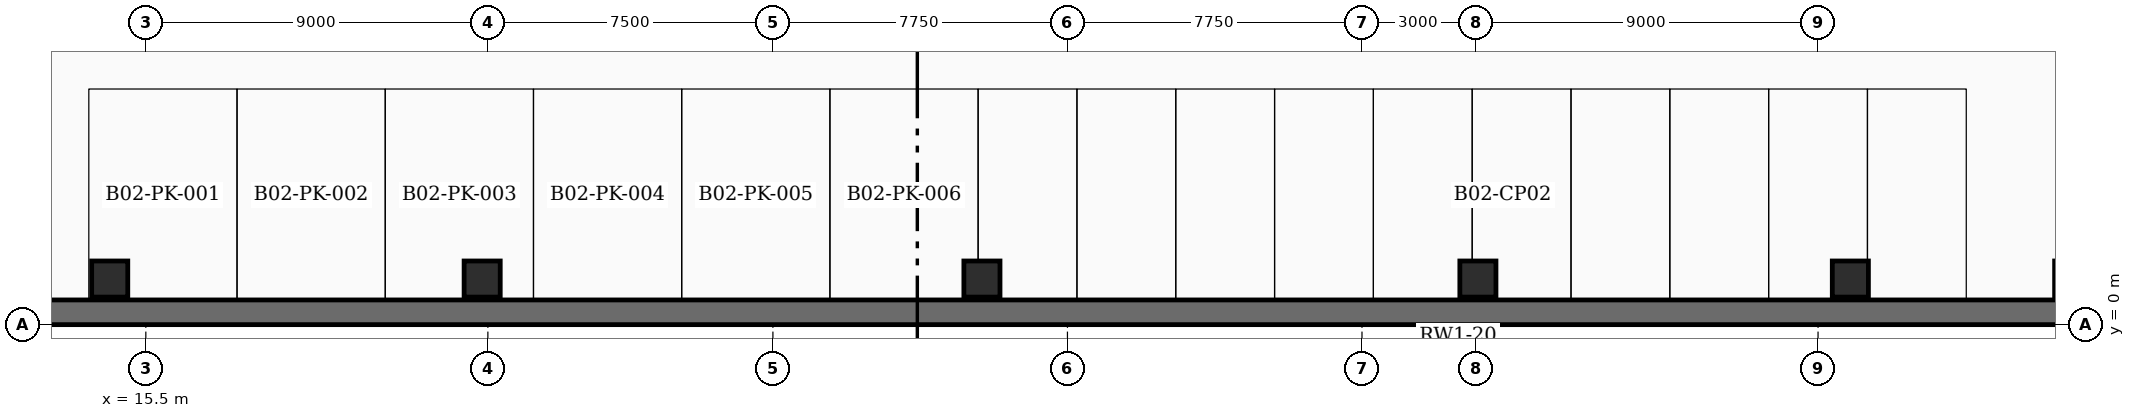
"""IFC4 building model, lengths in metres.
Left out: names, types, materials, properties, quantities, classifications, styles, units other than length and angle.
Written with IfcOpenShell. Run it as: python <this file> out.ifc"""

import sys

from ifc_helpers import new_model, si_unit, direction, frame, frame_2d, origin, origin_2d, place, context, subcontext, project, spatial, rectangle, extrude, element, save


model = new_model("IFC4")
c1 = context("Model", 3, precision=1e-05, world=origin(), true_north=direction((0.0, 1.0)))
c2 = subcontext(c1, "Body", "Model", "MODEL_VIEW")
j1 = project(units=[si_unit("LENGTHUNIT", "METRE"), si_unit("PLANEANGLEUNIT", "RADIAN")], contexts=[c1])
p1 = place(None, origin())
s1 = spatial("IfcSite", under=j1, at=p1, CompositionType="ELEMENT")
p2 = place(p1, origin())
s2 = spatial("IfcBuilding", under=s1, at=p2, CompositionType="ELEMENT")
p3 = place(p2, frame((0.0, 0.0, -10.0)))
s3 = spatial("IfcBuildingStorey", under=s2, at=p3, CompositionType="ELEMENT", Elevation=-10.0)
p4 = place(p3, frame((74.015, 0.325, -0.85), z_axis=(0.0, 0.0, 1.0), x_axis=(-1.0, 0.0, 0.0)))
e1 = element("IfcWall", 1, at=p4, inside=s3, PredefinedType="USERDEFINED", context=c2, shape_type="SweptSolid", body=[
    extrude(rectangle(XDim=68.53, YDim=0.65, at=frame_2d((34.265, 0.0))), origin(), (0.0, 0.0, 1.0), 5.54),
])
for number, where, z_axis, x_axis in (
    (2, (14.55, 1.2, -0.85), (0.0, 0.0, 1.0), (1.0, 0.0, 0.0)),
    (3, (24.35, 1.2, -0.85), (0.0, 0.0, 1.0), (1.0, 0.0, 0.0)),
    (4, (37.5, 1.2, -0.85), (0.0, 0.0, 1.0), (1.0, 0.0, 0.0)),
    (5, (50.55, 1.2, -0.85), (0.0, 0.0, 1.0), (1.0, 0.0, 0.0)),
    (6, (60.35, 1.2, -0.85), (0.0, 0.0, 1.0), (1.0, 0.0, 0.0)),
    (7, (66.2, 1.2, -0.85), (0.0, 0.0, 1.0), (1.0, 0.0, 0.0)),
):
    element("IfcColumn", number, at=place(p3, frame(where, z_axis=z_axis, x_axis=x_axis)), inside=s3, PredefinedType="COLUMN", context=c2, shape_type="SweptSolid", body=[
        extrude(rectangle(XDim=0.95, YDim=0.95, at=origin_2d()), origin(), (0.0, 0.0, 1.0), 5.54),
    ])
save(model, sys.argv[1])
